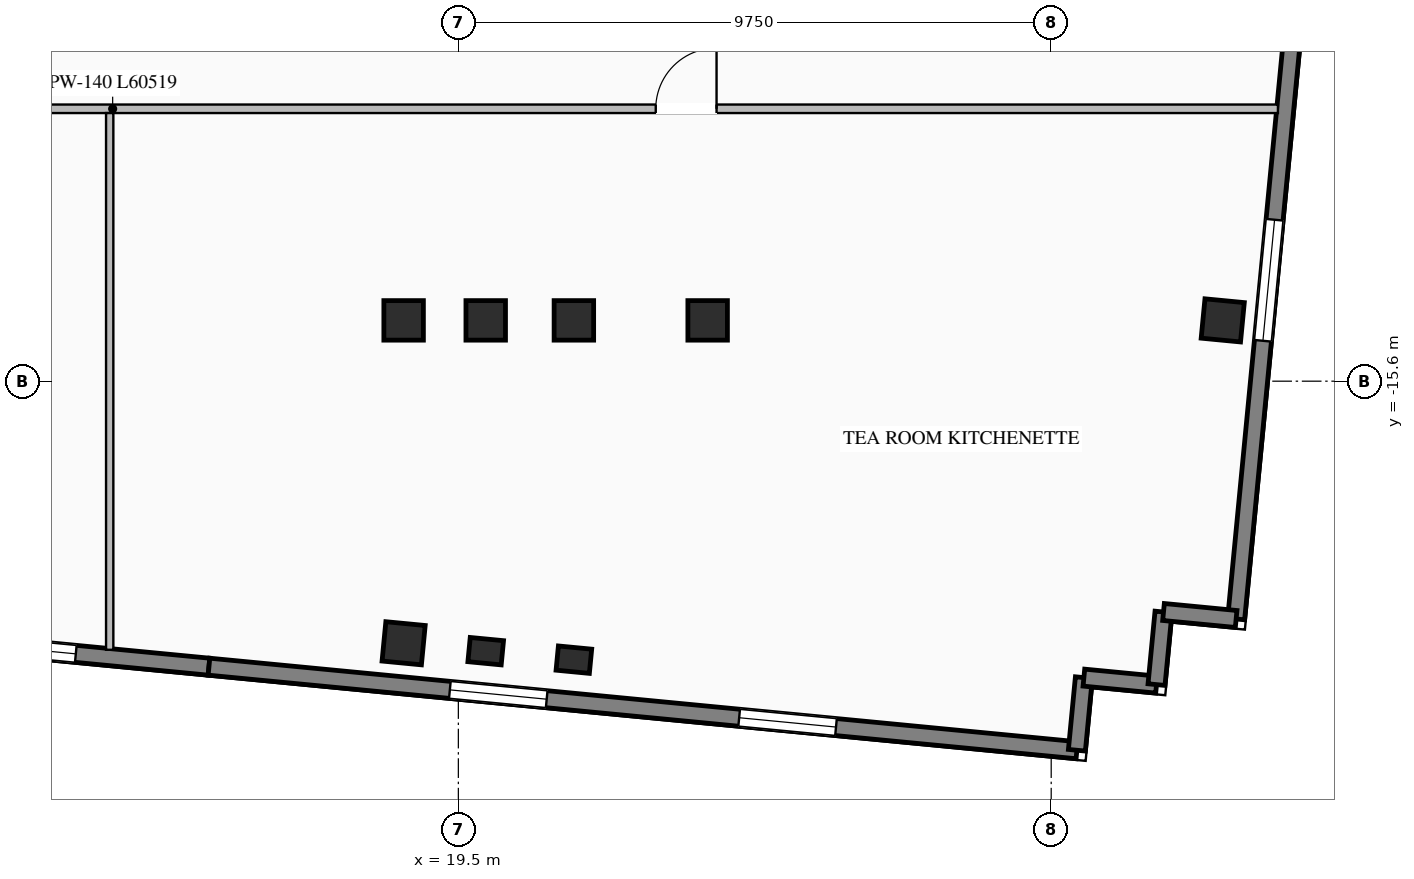
"""IFC4 building model, lengths in metres.
Left out: names, types, materials, properties, quantities, classifications, styles, units other than length and angle.
Written with IfcOpenShell. Run it as: python <this file> out.ifc"""

import sys

from ifc_helpers import new_model, si_unit, direction, frame, frame_2d, origin, origin_2d, place, context, subcontext, project, spatial, rectangle, i_section, extrude, element, fill, save


model = new_model("IFC4")
c1 = context("Model", 3, precision=1e-05, world=origin(), true_north=direction((0.0, 1.0)))
c2 = subcontext(c1, "Body", "Model", "MODEL_VIEW")
j1 = project(units=[si_unit("LENGTHUNIT", "METRE"), si_unit("PLANEANGLEUNIT", "RADIAN")], contexts=[c1])
p1 = place(None, origin())
s1 = spatial("IfcSite", under=j1, at=p1, CompositionType="ELEMENT")
p2 = place(p1, origin())
s2 = spatial("IfcBuilding", under=s1, at=p2, CompositionType="ELEMENT")
p3 = place(p2, frame((0.0, 0.0, 160.4)))
s3 = spatial("IfcBuildingStorey", under=s2, at=p3, CompositionType="ELEMENT", Elevation=160.4)
for number, where, z_axis, x_axis in (
    (1, (18.6, -14.6, 0.0), (0.0, 0.0, 1.0), (1.0, 0.0, 0.0)),
    (2, (19.95, -14.6, 0.0), (0.0, 0.0, 1.0), (1.0, 0.0, 0.0)),
    (3, (21.4, -14.6, 0.0), (0.0, 0.0, 1.0), (1.0, 0.0, 0.0)),
    (4, (23.6, -14.6, 0.0), (0.0, 0.0, 1.0), (1.0, 0.0, 0.0)),
    (5, (18.6, -19.911, 0.0), (0.0, 0.0, 1.0), (0.995, -0.096, 0.0)),
    (6, (32.071, -14.6, 0.0), (0.0, 0.0, 1.0), (0.995, -0.096, 0.0)),
):
    element("IfcColumn", number, at=place(p3, frame(where, z_axis=z_axis, x_axis=x_axis)), inside=s3, PredefinedType="COLUMN", context=c2, shape_type="SweptSolid", body=[
        extrude(i_section(OverallWidth=0.65, OverallDepth=0.65, WebThickness=0.028, FlangeThickness=0.04, at=origin_2d()), origin(), (0.0, 0.0, 1.0), 3.45),
    ])
for number, where, z_axis, x_axis in (
    (7, (19.95, -20.041, 0.0), (0.0, 0.0, 1.0), (0.995, -0.096, 0.0)),
    (8, (21.4, -20.18, 0.0), (0.0, 0.0, 1.0), (0.995, -0.096, 0.0)),
):
    element("IfcColumn", number, at=place(p3, frame(where, z_axis=z_axis, x_axis=x_axis)), inside=s3, PredefinedType="PILASTER", context=c2, shape_type="SweptSolid", body=[
        extrude(rectangle(XDim=0.55, YDim=0.4, at=origin_2d()), origin(), (0.0, 0.0, 1.0), 3.45),
    ])
p4 = place(p3, frame((15.399, -20.296, 0.0), z_axis=(0.0, 0.0, 1.0), x_axis=(-0.995394455533, 0.09586385082, 0.0)))
e9 = element("IfcWall", 9, at=p4, inside=s3, PredefinedType="STANDARD", context=c2, shape_type="SweptSolid", body=[
    extrude(rectangle(XDim=9.0, YDim=0.28, at=frame_2d((4.5, 0.0))), origin(), (0.0, 0.0, 1.0), 3.25),
])
p5 = place(p4, frame((2.2, 0.0, 0.76)))
e10 = element("IfcOpeningElement", 10, at=p5, cuts=e9, PredefinedType="OPENING", context=c2, shape_type="SweptSolid", body=[
    extrude(rectangle(XDim=1.6, YDim=1.95, at=frame_2d((0.8, 0.975))), frame((0.0, 0.15, 0.0), z_axis=(0.0, -1.0, 0.0), x_axis=(1.0, 0.0, 0.0)), (0.0, 0.0, 1.0), 0.3),
])
p6 = place(p4, frame((5.2, 0.0, 0.76)))
e11 = element("IfcOpeningElement", 11, at=p6, cuts=e9, PredefinedType="OPENING", context=c2, shape_type="SweptSolid", body=[
    extrude(rectangle(XDim=1.6, YDim=1.95, at=frame_2d((0.8, 0.975))), frame((0.0, 0.15, 0.0), z_axis=(0.0, -1.0, 0.0), x_axis=(1.0, 0.0, 0.0)), (0.0, 0.0, 1.0), 0.3),
])
p7 = place(p3, frame((29.673, -21.67, 0.0), z_axis=(0.0, 0.0, 1.0), x_axis=(-0.995397230529, 0.095835032509, 0.0)))
e12 = element("IfcWall", 12, at=p7, inside=s3, PredefinedType="STANDARD", context=c2, shape_type="SweptSolid", body=[
    extrude(rectangle(XDim=14.34, YDim=0.28, at=frame_2d((7.17, 0.0))), origin(), (0.0, 0.0, 1.0), 3.25),
])
p8 = place(p7, frame((3.98, 0.0, 0.76)))
e13 = element("IfcOpeningElement", 13, at=p8, cuts=e12, PredefinedType="OPENING", context=c2, shape_type="SweptSolid", body=[
    extrude(rectangle(XDim=1.6, YDim=1.95, at=frame_2d((0.8, 0.975))), frame((0.0, 0.15, 0.0), z_axis=(0.0, -1.0, 0.0), x_axis=(1.0, 0.0, 0.0)), (0.0, 0.0, 1.0), 0.3),
])
p9 = place(p7, frame((8.76, 0.0, 0.76)))
e14 = element("IfcOpeningElement", 14, at=p9, cuts=e12, PredefinedType="OPENING", context=c2, shape_type="SweptSolid", body=[
    extrude(rectangle(XDim=1.6, YDim=1.95, at=frame_2d((0.8, 0.975))), frame((0.0, 0.15, 0.0), z_axis=(0.0, -1.0, 0.0), x_axis=(1.0, 0.0, 0.0)), (0.0, 0.0, 1.0), 0.3),
])
p10 = place(p3, frame((33.901, -2.798, 0.0), z_axis=(0.0, 0.0, 1.0), x_axis=(-0.095853434568, -0.99539545864, 0.0)))
e15 = element("IfcWall", 15, at=p10, inside=s3, PredefinedType="STANDARD", context=c2, shape_type="SweptSolid", body=[
    extrude(rectangle(XDim=16.79, YDim=0.28, at=frame_2d((8.395, 0.0))), origin(), (0.0, 0.0, 1.0), 3.25),
])
p11 = place(p10, frame((3.547, 0.0, 0.76)))
e16 = element("IfcOpeningElement", 16, at=p11, cuts=e15, PredefinedType="OPENING", context=c2, shape_type="SweptSolid", body=[
    extrude(rectangle(XDim=2.0, YDim=2.05, at=frame_2d((1.0, 1.025))), frame((0.0, 0.15, 0.0), z_axis=(0.0, -1.0, 0.0), x_axis=(1.0, 0.0, 0.0)), (0.0, 0.0, 1.0), 0.3),
])
p12 = place(p10, frame((10.193, 0.0, 0.76)))
e17 = element("IfcOpeningElement", 17, at=p12, cuts=e15, PredefinedType="OPENING", context=c2, shape_type="SweptSolid", body=[
    extrude(rectangle(XDim=2.0, YDim=2.05, at=frame_2d((1.0, 1.025))), frame((0.0, 0.15, 0.0), z_axis=(0.0, -1.0, 0.0), x_axis=(1.0, 0.0, 0.0)), (0.0, 0.0, 1.0), 0.3),
])
for number, where, z_axis, x_axis in (
    (18, (29.673, -21.67, 0.0), (0.0, 0.0, 1.0), (0.096, 0.995, 0.0)),
    (19, (29.788, -20.476, 0.0), (0.0, 0.0, 1.0), (0.995, -0.096, 0.0)),
):
    element("IfcWall", number, at=place(p3, frame(where, z_axis=z_axis, x_axis=x_axis)), inside=s3, PredefinedType="STANDARD", context=c2, shape_type="SweptSolid", body=[
        extrude(rectangle(XDim=1.2, YDim=0.28, at=frame_2d((0.6, 0.0))), origin(), (0.0, 0.0, 1.0), 3.25),
    ])
p13 = place(p3, frame((30.982, -20.591, 0.0), z_axis=(0.0, 0.0, 1.0), x_axis=(0.096018626938, 0.995379537303, 0.0)))
e20 = element("IfcWall", 20, at=p13, inside=s3, PredefinedType="STANDARD", context=c2, shape_type="SweptSolid", body=[
    extrude(rectangle(XDim=1.2, YDim=0.28, at=frame_2d((0.6, 0.0))), origin(), (0.0, 0.0, 1.0), 3.25),
])
p14 = place(p3, frame((31.097, -19.396, 0.0), z_axis=(0.0, 0.0, 1.0), x_axis=(0.995397091755, -0.095836473879, 0.0)))
e21 = element("IfcWall", 21, at=p14, inside=s3, PredefinedType="STANDARD", context=c2, shape_type="SweptSolid", body=[
    extrude(rectangle(XDim=1.2, YDim=0.28, at=frame_2d((0.6, 0.0))), origin(), (0.0, 0.0, 1.0), 3.25),
])
p15 = place(p3, frame((-27.54, -11.12, 0.0), z_axis=(0.0, 0.0, 1.0), x_axis=(1.0, 0.0, 0.0)))
e22 = element("IfcWall", 22, at=p15, inside=s3, PredefinedType="STANDARD", context=c2, shape_type="SweptSolid", body=[
    extrude(rectangle(XDim=60.519, YDim=0.14, at=frame_2d((30.259, 0.0))), origin(), (0.0, 0.0, 1.0), 3.25),
])
p16 = place(p15, frame((14.63, 0.0, 0.0)))
e23 = element("IfcOpeningElement", 23, at=p16, cuts=e22, PredefinedType="OPENING", context=c2, shape_type="SweptSolid", body=[
    extrude(rectangle(XDim=0.92, YDim=2.08, at=frame_2d((0.46, 1.04))), frame((0.0, 0.08, 0.0), z_axis=(0.0, -1.0, 0.0), x_axis=(1.0, 0.0, 0.0)), (0.0, 0.0, 1.0), 0.16),
])
p17 = place(p15, frame((18.13, 0.0, 0.0)))
e24 = element("IfcOpeningElement", 24, at=p17, cuts=e22, PredefinedType="OPENING", context=c2, shape_type="SweptSolid", body=[
    extrude(rectangle(XDim=0.92, YDim=2.08, at=frame_2d((0.46, 1.04))), frame((0.0, 0.08, 0.0), z_axis=(0.0, -1.0, 0.0), x_axis=(1.0, 0.0, 0.0)), (0.0, 0.0, 1.0), 0.16),
])
p18 = place(p15, frame((20.98, 0.0, 0.0)))
e25 = element("IfcOpeningElement", 25, at=p18, cuts=e22, PredefinedType="OPENING", context=c2, shape_type="SweptSolid", body=[
    extrude(rectangle(XDim=0.92, YDim=2.08, at=frame_2d((0.46, 1.04))), frame((0.0, 0.08, 0.0), z_axis=(0.0, -1.0, 0.0), x_axis=(1.0, 0.0, 0.0)), (0.0, 0.0, 1.0), 0.16),
])
p19 = place(p15, frame((2.884, 0.0, 0.0)))
e26 = element("IfcOpeningElement", 26, at=p19, cuts=e22, PredefinedType="OPENING", context=c2, shape_type="SweptSolid", body=[
    extrude(rectangle(XDim=1.0, YDim=2.08, at=frame_2d((0.5, 1.04))), frame((0.0, 0.08, 0.0), z_axis=(0.0, -1.0, 0.0), x_axis=(1.0, 0.0, 0.0)), (0.0, 0.0, 1.0), 0.16),
])
p20 = place(p15, frame((9.428, 0.0, 0.0)))
e27 = element("IfcOpeningElement", 27, at=p20, cuts=e22, PredefinedType="OPENING", context=c2, shape_type="SweptSolid", body=[
    extrude(rectangle(XDim=1.0, YDim=2.08, at=frame_2d((0.5, 1.04))), frame((0.0, 0.08, 0.0), z_axis=(0.0, -1.0, 0.0), x_axis=(1.0, 0.0, 0.0)), (0.0, 0.0, 1.0), 0.16),
])
p21 = place(p15, frame((31.423, 0.0, 0.0)))
e28 = element("IfcOpeningElement", 28, at=p21, cuts=e22, PredefinedType="OPENING", context=c2, shape_type="SweptSolid", body=[
    extrude(rectangle(XDim=1.0, YDim=2.08, at=frame_2d((0.5, 1.04))), frame((0.0, 0.08, 0.0), z_axis=(0.0, -1.0, 0.0), x_axis=(1.0, 0.0, 0.0)), (0.0, 0.0, 1.0), 0.16),
])
p22 = place(p15, frame((50.286, 0.0, 0.0)))
e29 = element("IfcOpeningElement", 29, at=p22, cuts=e22, PredefinedType="OPENING", context=c2, shape_type="SweptSolid", body=[
    extrude(rectangle(XDim=1.0, YDim=2.08, at=frame_2d((0.5, 1.04))), frame((0.0, 0.08, 0.0), z_axis=(0.0, -1.0, 0.0), x_axis=(1.0, 0.0, 0.0)), (0.0, 0.0, 1.0), 0.16),
])
p23 = place(p3, frame((13.766, -20.018, 0.0), z_axis=(0.0, 0.0, 1.0), x_axis=(0.0, 1.0, 0.0)))
e30 = element("IfcWall", 30, at=p23, inside=s3, PredefinedType="STANDARD", context=c2, shape_type="SweptSolid", body=[
    extrude(rectangle(XDim=8.828, YDim=0.12, at=frame_2d((4.414, 0.0))), origin(), (0.0, 0.0, 1.0), 3.25),
])
p24 = place(p5, origin())
e31 = element("IfcWindow", 31, at=p24, inside=s3, PartitioningType="SINGLE_PANEL", PredefinedType="WINDOW", context=c2, shape_type="SweptSolid", body=[
    extrude(rectangle(XDim=1.6, YDim=1.95, at=frame_2d((0.8, 0.975))), frame((0.0, 0.03, 0.0), z_axis=(0.0, -1.0, 0.0), x_axis=(1.0, 0.0, 0.0)), (0.0, 0.0, 1.0), 0.06),
])
fill(e10, e31)
p25 = place(p8, origin())
e32 = element("IfcWindow", 32, at=p25, inside=s3, PartitioningType="SINGLE_PANEL", PredefinedType="WINDOW", context=c2, shape_type="SweptSolid", body=[
    extrude(rectangle(XDim=1.6, YDim=1.95, at=frame_2d((0.8, 0.975))), frame((0.0, 0.03, 0.0), z_axis=(0.0, -1.0, 0.0), x_axis=(1.0, 0.0, 0.0)), (0.0, 0.0, 1.0), 0.06),
])
fill(e13, e32)
p26 = place(p9, origin())
e33 = element("IfcWindow", 33, at=p26, inside=s3, PartitioningType="SINGLE_PANEL", PredefinedType="WINDOW", context=c2, shape_type="SweptSolid", body=[
    extrude(rectangle(XDim=1.6, YDim=1.95, at=frame_2d((0.8, 0.975))), frame((0.0, 0.03, 0.0), z_axis=(0.0, -1.0, 0.0), x_axis=(1.0, 0.0, 0.0)), (0.0, 0.0, 1.0), 0.06),
])
fill(e14, e33)
p27 = place(p12, origin())
e34 = element("IfcWindow", 34, at=p27, inside=s3, PartitioningType="DOUBLE_PANEL_VERTICAL", PredefinedType="WINDOW", context=c2, shape_type="SweptSolid", body=[
    extrude(rectangle(XDim=2.0, YDim=2.05, at=frame_2d((1.0, 1.025))), frame((0.0, 0.03, 0.0), z_axis=(0.0, -1.0, 0.0), x_axis=(1.0, 0.0, 0.0)), (0.0, 0.0, 1.0), 0.06),
])
fill(e17, e34)
p28 = place(p22, origin())
e35 = element("IfcDoor", 35, at=p28, inside=s3, OperationType="SINGLE_SWING_RIGHT", PredefinedType="DOOR", context=c2, shape_type="SweptSolid", body=[
    extrude(rectangle(XDim=1.0, YDim=2.08, at=frame_2d((0.5, 1.04))), frame((0.0, 0.025, 0.0), z_axis=(0.0, -1.0, 0.0), x_axis=(1.0, 0.0, 0.0)), (0.0, 0.0, 1.0), 0.05),
])
fill(e29, e35)
save(model, sys.argv[1])
